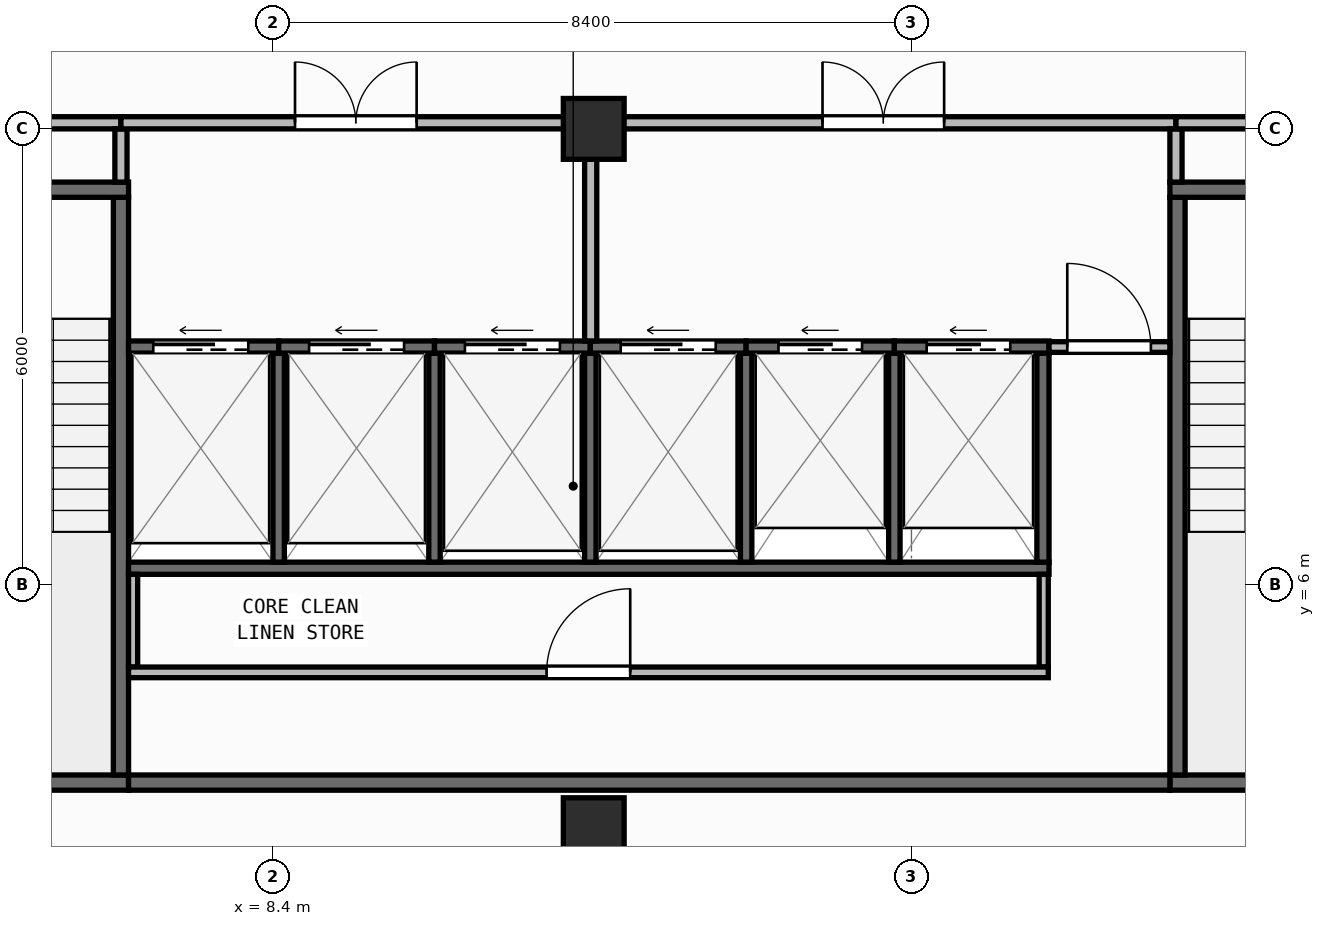
"""IFC4 building model, lengths in metres.
Left out: names, types, materials, properties, quantities, classifications, styles, units other than length and angle.
Written with IfcOpenShell. Run it as: python <this file> out.ifc"""

import sys

from ifc_helpers import new_model, si_unit, direction, frame, frame_2d, origin, origin_2d, place, context, subcontext, project, spatial, rectangle, extrude, element, fill, save


model = new_model("IFC4")
c1 = context("Model", 3, precision=1e-05, world=origin(), true_north=direction((0.0, 1.0)))
c2 = subcontext(c1, "Body", "Model", "MODEL_VIEW")
j1 = project(units=[si_unit("LENGTHUNIT", "METRE"), si_unit("PLANEANGLEUNIT", "RADIAN")], contexts=[c1])
p1 = place(None, origin())
s1 = spatial("IfcSite", under=j1, at=p1, CompositionType="ELEMENT")
p2 = place(p1, origin())
s2 = spatial("IfcBuilding", under=s1, at=p2, CompositionType="ELEMENT")
p3 = place(p2, frame((0.0, 0.0, 248.65)))
s3 = spatial("IfcBuildingStorey", under=s2, at=p3, CompositionType="ELEMENT", Elevation=248.65)
for number, where, z_axis, x_axis in (
    (1, (12.62, 2.8, 0.0), (0.0, 0.0, 1.0), (1.0, 0.0, 0.0)),
    (2, (12.62, 12.0, 0.0), (0.0, 0.0, 1.0), (1.0, 0.0, 0.0)),
):
    element("IfcColumn", number, at=place(p3, frame(where, z_axis=z_axis, x_axis=x_axis)), inside=s3, PredefinedType="COLUMN", context=c2, shape_type="SweptSolid", body=[
        extrude(rectangle(XDim=0.8, YDim=0.8, at=origin_2d()), origin(), (0.0, 0.0, 1.0), 3.95),
    ])
p4 = place(p3, frame((2.66, 0.174, 0.0), z_axis=(0.0, 0.0, 1.0), x_axis=(0.996611813627, 0.082248969229, 0.0)))
e3 = element("IfcWall", 3, at=p4, inside=s3, PredefinedType="STANDARD", context=c2, shape_type="SweptSolid", body=[
    extrude(rectangle(XDim=41.019, YDim=0.26, at=frame_2d((20.51, 0.0))), origin(), (0.0, 0.0, 1.0), 3.71),
])
p5 = place(p4, frame((19.31, 0.0, 0.9)))
e4 = element("IfcOpeningElement", 4, at=p5, cuts=e3, PredefinedType="OPENING", context=c2, shape_type="SweptSolid", body=[
    extrude(rectangle(XDim=2.4, YDim=1.65, at=frame_2d((1.2, 0.825))), frame((0.0, 0.14, 0.0), z_axis=(0.0, -1.0, 0.0), x_axis=(1.0, 0.0, 0.0)), (0.0, 0.0, 1.0), 0.28),
])
p6 = place(p3, frame((2.8, 3.4, 0.0), z_axis=(0.0, 0.0, 1.0), x_axis=(1.0, 0.0, 0.0)))
e5 = element("IfcWall", 5, at=p6, inside=s3, PredefinedType="SHEAR", context=c2, shape_type="SweptSolid", body=[
    extrude(rectangle(XDim=3.7, YDim=0.2, at=frame_2d((1.85, 0.0))), origin(), (0.0, 0.0, 1.0), 3.71),
])
p7 = place(p3, frame((6.4, 3.5, 0.0), z_axis=(0.0, 0.0, 1.0), x_axis=(0.0, 1.0, 0.0)))
e6 = element("IfcWall", 6, at=p7, inside=s3, PredefinedType="SHEAR", context=c2, shape_type="SweptSolid", body=[
    extrude(rectangle(XDim=7.6, YDim=0.2, at=frame_2d((3.8, 0.0))), origin(), (0.0, 0.0, 1.0), 3.71),
])
p8 = place(p3, frame((2.8, 11.2, 0.0), z_axis=(0.0, 0.0, 1.0), x_axis=(1.0, 0.0, 0.0)))
e7 = element("IfcWall", 7, at=p8, inside=s3, PredefinedType="SHEAR", context=c2, shape_type="SweptSolid", body=[
    extrude(rectangle(XDim=3.7, YDim=0.2, at=frame_2d((1.85, 0.0))), origin(), (0.0, 0.0, 1.0), 3.71),
])
p9 = place(p8, frame((1.2, 0.0, 0.0)))
e8 = element("IfcOpeningElement", 8, at=p9, cuts=e7, PredefinedType="OPENING", context=c2, shape_type="SweptSolid", body=[
    extrude(rectangle(XDim=1.3, YDim=2.15, at=frame_2d((0.65, 1.075))), frame((0.0, 0.11, 0.0), z_axis=(0.0, -1.0, 0.0), x_axis=(1.0, 0.0, 0.0)), (0.0, 0.0, 1.0), 0.22),
])
p10 = place(p3, frame((20.2, 3.4, 0.0), z_axis=(0.0, 0.0, 1.0), x_axis=(1.0, 0.0, 0.0)))
e9 = element("IfcWall", 9, at=p10, inside=s3, PredefinedType="SHEAR", context=c2, shape_type="SweptSolid", body=[
    extrude(rectangle(XDim=3.7, YDim=0.2, at=frame_2d((1.85, 0.0))), origin(), (0.0, 0.0, 1.0), 3.71),
])
p11 = place(p3, frame((20.3, 3.5, 0.0), z_axis=(0.0, 0.0, 1.0), x_axis=(0.0, 1.0, 0.0)))
e10 = element("IfcWall", 10, at=p11, inside=s3, PredefinedType="SHEAR", context=c2, shape_type="SweptSolid", body=[
    extrude(rectangle(XDim=7.6, YDim=0.2, at=frame_2d((3.8, 0.0))), origin(), (0.0, 0.0, 1.0), 3.71),
])
p12 = place(p3, frame((20.2, 11.2, 0.0), z_axis=(0.0, 0.0, 1.0), x_axis=(1.0, 0.0, 0.0)))
e11 = element("IfcWall", 11, at=p12, inside=s3, PredefinedType="SHEAR", context=c2, shape_type="SweptSolid", body=[
    extrude(rectangle(XDim=3.7, YDim=0.2, at=frame_2d((1.85, 0.0))), origin(), (0.0, 0.0, 1.0), 3.71),
])
p13 = place(p12, frame((1.2, 0.0, 0.0)))
e12 = element("IfcOpeningElement", 12, at=p13, cuts=e11, PredefinedType="OPENING", context=c2, shape_type="SweptSolid", body=[
    extrude(rectangle(XDim=1.3, YDim=2.15, at=frame_2d((0.65, 1.075))), frame((0.0, 0.11, 0.0), z_axis=(0.0, -1.0, 0.0), x_axis=(1.0, 0.0, 0.0)), (0.0, 0.0, 1.0), 0.22),
])
p14 = place(p3, frame((6.5, 3.4, 0.0), z_axis=(0.0, 0.0, 1.0), x_axis=(1.0, 0.0, 0.0)))
e13 = element("IfcWall", 13, at=p14, inside=s3, PredefinedType="SHEAR", context=c2, shape_type="SweptSolid", body=[
    extrude(rectangle(XDim=13.7, YDim=0.2, at=frame_2d((6.85, 0.0))), origin(), (0.0, 0.0, 1.0), 3.71),
])
p15 = place(p3, frame((6.5, 6.22, 0.0), z_axis=(0.0, 0.0, 1.0), x_axis=(1.0, 0.0, 0.0)))
e14 = element("IfcWall", 14, at=p15, inside=s3, PredefinedType="SHEAR", context=c2, shape_type="SweptSolid", body=[
    extrude(rectangle(XDim=12.11, YDim=0.16, at=frame_2d((6.055, 0.0))), origin(), (0.0, 0.0, 1.0), 3.71),
])
p16 = place(p3, frame((18.53, 6.3, 0.0), z_axis=(0.0, 0.0, 1.0), x_axis=(0.0, 1.0, 0.0)))
e15 = element("IfcWall", 15, at=p16, inside=s3, PredefinedType="SHEAR", context=c2, shape_type="SweptSolid", body=[
    extrude(rectangle(XDim=2.75, YDim=0.16, at=frame_2d((1.375, 0.0))), origin(), (0.0, 0.0, 1.0), 3.71),
])
for number, where, z_axis, x_axis in (
    (16, (8.475, 6.3, 0.0), (0.0, 0.0, 1.0), (0.0, 1.0, 0.0)),
    (17, (10.525, 6.3, 0.0), (0.0, 0.0, 1.0), (0.0, 1.0, 0.0)),
    (18, (12.575, 6.3, 0.0), (0.0, 0.0, 1.0), (0.0, 1.0, 0.0)),
    (19, (14.625, 6.3, 0.0), (0.0, 0.0, 1.0), (0.0, 1.0, 0.0)),
    (20, (16.575, 6.3, 0.0), (0.0, 0.0, 1.0), (0.0, 1.0, 0.0)),
):
    element("IfcWall", number, at=place(p3, frame(where, z_axis=z_axis, x_axis=x_axis)), inside=s3, PredefinedType="SHEAR", context=c2, shape_type="SweptSolid", body=[
        extrude(rectangle(XDim=2.75, YDim=0.15, at=frame_2d((1.375, 0.0))), origin(), (0.0, 0.0, 1.0), 3.71),
    ])
p17 = place(p3, frame((6.5, 9.13, 0.0), z_axis=(0.0, 0.0, 1.0), x_axis=(1.0, 0.0, 0.0)))
e21 = element("IfcWall", 21, at=p17, inside=s3, PredefinedType="SHEAR", context=c2, shape_type="SweptSolid", body=[
    extrude(rectangle(XDim=1.975, YDim=0.16, at=frame_2d((0.988, 0.0))), origin(), (0.0, 0.0, 1.0), 3.71),
])
p18 = place(p17, frame((0.325, 0.0, 0.0)))
e22 = element("IfcOpeningElement", 22, at=p18, cuts=e21, PredefinedType="OPENING", context=c2, shape_type="SweptSolid", body=[
    extrude(rectangle(XDim=1.25, YDim=2.15, at=frame_2d((0.625, 1.075))), frame((0.0, 0.09, 0.0), z_axis=(0.0, -1.0, 0.0), x_axis=(1.0, 0.0, 0.0)), (0.0, 0.0, 1.0), 0.18),
])
p19 = place(p3, frame((8.475, 9.13, 0.0), z_axis=(0.0, 0.0, 1.0), x_axis=(1.0, 0.0, 0.0)))
e23 = element("IfcWall", 23, at=p19, inside=s3, PredefinedType="SHEAR", context=c2, shape_type="SweptSolid", body=[
    extrude(rectangle(XDim=2.05, YDim=0.16, at=frame_2d((1.025, 0.0))), origin(), (0.0, 0.0, 1.0), 3.71),
])
p20 = place(p19, frame((0.4, 0.0, 0.0)))
e24 = element("IfcOpeningElement", 24, at=p20, cuts=e23, PredefinedType="OPENING", context=c2, shape_type="SweptSolid", body=[
    extrude(rectangle(XDim=1.25, YDim=2.15, at=frame_2d((0.625, 1.075))), frame((0.0, 0.09, 0.0), z_axis=(0.0, -1.0, 0.0), x_axis=(1.0, 0.0, 0.0)), (0.0, 0.0, 1.0), 0.18),
])
p21 = place(p3, frame((10.525, 9.13, 0.0), z_axis=(0.0, 0.0, 1.0), x_axis=(1.0, 0.0, 0.0)))
e25 = element("IfcWall", 25, at=p21, inside=s3, PredefinedType="SHEAR", context=c2, shape_type="SweptSolid", body=[
    extrude(rectangle(XDim=2.05, YDim=0.16, at=frame_2d((1.025, 0.0))), origin(), (0.0, 0.0, 1.0), 3.71),
])
p22 = place(p21, frame((0.4, 0.0, 0.0)))
e26 = element("IfcOpeningElement", 26, at=p22, cuts=e25, PredefinedType="OPENING", context=c2, shape_type="SweptSolid", body=[
    extrude(rectangle(XDim=1.25, YDim=2.15, at=frame_2d((0.625, 1.075))), frame((0.0, 0.09, 0.0), z_axis=(0.0, -1.0, 0.0), x_axis=(1.0, 0.0, 0.0)), (0.0, 0.0, 1.0), 0.18),
])
p23 = place(p3, frame((12.575, 9.13, 0.0), z_axis=(0.0, 0.0, 1.0), x_axis=(1.0, 0.0, 0.0)))
e27 = element("IfcWall", 27, at=p23, inside=s3, PredefinedType="SHEAR", context=c2, shape_type="SweptSolid", body=[
    extrude(rectangle(XDim=2.05, YDim=0.16, at=frame_2d((1.025, 0.0))), origin(), (0.0, 0.0, 1.0), 3.71),
])
p24 = place(p23, frame((0.4, 0.0, 0.0)))
e28 = element("IfcOpeningElement", 28, at=p24, cuts=e27, PredefinedType="OPENING", context=c2, shape_type="SweptSolid", body=[
    extrude(rectangle(XDim=1.25, YDim=2.15, at=frame_2d((0.625, 1.075))), frame((0.0, 0.09, 0.0), z_axis=(0.0, -1.0, 0.0), x_axis=(1.0, 0.0, 0.0)), (0.0, 0.0, 1.0), 0.18),
])
p25 = place(p3, frame((14.625, 9.13, 0.0), z_axis=(0.0, 0.0, 1.0), x_axis=(1.0, 0.0, 0.0)))
e29 = element("IfcWall", 29, at=p25, inside=s3, PredefinedType="SHEAR", context=c2, shape_type="SweptSolid", body=[
    extrude(rectangle(XDim=1.95, YDim=0.16, at=frame_2d((0.975, 0.0))), origin(), (0.0, 0.0, 1.0), 3.71),
])
p26 = place(p25, frame((0.425, 0.0, 0.0)))
e30 = element("IfcOpeningElement", 30, at=p26, cuts=e29, PredefinedType="OPENING", context=c2, shape_type="SweptSolid", body=[
    extrude(rectangle(XDim=1.1, YDim=2.15, at=frame_2d((0.55, 1.075))), frame((0.0, 0.09, 0.0), z_axis=(0.0, -1.0, 0.0), x_axis=(1.0, 0.0, 0.0)), (0.0, 0.0, 1.0), 0.18),
])
p27 = place(p3, frame((16.575, 9.13, 0.0), z_axis=(0.0, 0.0, 1.0), x_axis=(1.0, 0.0, 0.0)))
e31 = element("IfcWall", 31, at=p27, inside=s3, PredefinedType="SHEAR", context=c2, shape_type="SweptSolid", body=[
    extrude(rectangle(XDim=2.035, YDim=0.16, at=frame_2d((1.018, 0.0))), origin(), (0.0, 0.0, 1.0), 3.71),
])
p28 = place(p27, frame((0.425, 0.0, 0.0)))
e32 = element("IfcOpeningElement", 32, at=p28, cuts=e31, PredefinedType="OPENING", context=c2, shape_type="SweptSolid", body=[
    extrude(rectangle(XDim=1.1, YDim=2.15, at=frame_2d((0.55, 1.075))), frame((0.0, 0.09, 0.0), z_axis=(0.0, -1.0, 0.0), x_axis=(1.0, 0.0, 0.0)), (0.0, 0.0, 1.0), 0.18),
])
for number, where, z_axis, x_axis in (
    (33, (6.56, 4.92, 0.0), (0.0, 0.0, 1.0), (0.0, 1.0, 0.0)),
    (34, (18.54, 4.92, 0.0), (0.0, 0.0, 1.0), (0.0, 1.0, 0.0)),
):
    element("IfcWall", number, at=place(p3, frame(where, z_axis=z_axis, x_axis=x_axis)), inside=s3, PredefinedType="PARTITIONING", context=c2, shape_type="SweptSolid", body=[
        extrude(rectangle(XDim=1.22, YDim=0.12, at=frame_2d((0.61, 0.0))), origin(), (0.0, 0.0, 1.0), 3.71),
    ])
p29 = place(p3, frame((6.5, 4.85, 0.0), z_axis=(0.0, 0.0, 1.0), x_axis=(1.0, 0.0, 0.0)))
e35 = element("IfcWall", 35, at=p29, inside=s3, PredefinedType="PARTITIONING", context=c2, shape_type="SweptSolid", body=[
    extrude(rectangle(XDim=12.1, YDim=0.14, at=frame_2d((6.05, 0.0))), origin(), (0.0, 0.0, 1.0), 3.71),
])
p30 = place(p29, frame((5.5, 0.0, 0.0)))
e36 = element("IfcOpeningElement", 36, at=p30, cuts=e35, PredefinedType="OPENING", context=c2, shape_type="SweptSolid", body=[
    extrude(rectangle(XDim=1.1, YDim=2.1, at=frame_2d((0.55, 1.05))), frame((0.0, 0.08, 0.0), z_axis=(0.0, -1.0, 0.0), x_axis=(1.0, 0.0, 0.0)), (0.0, 0.0, 1.0), 0.16),
])
p31 = place(p3, frame((18.61, 9.13, 0.0), z_axis=(0.0, 0.0, 1.0), x_axis=(1.0, 0.0, 0.0)))
e37 = element("IfcWall", 37, at=p31, inside=s3, PredefinedType="PARTITIONING", context=c2, shape_type="SweptSolid", body=[
    extrude(rectangle(XDim=1.59, YDim=0.14, at=frame_2d((0.795, 0.0))), origin(), (0.0, 0.0, 1.0), 3.71),
])
p32 = place(p31, frame((0.24, 0.0, 0.0)))
e38 = element("IfcOpeningElement", 38, at=p32, cuts=e37, PredefinedType="OPENING", context=c2, shape_type="SweptSolid", body=[
    extrude(rectangle(XDim=1.1, YDim=2.1, at=frame_2d((0.55, 1.05))), frame((0.0, 0.08, 0.0), z_axis=(0.0, -1.0, 0.0), x_axis=(1.0, 0.0, 0.0)), (0.0, 0.0, 1.0), 0.16),
])
p33 = place(p3, frame((2.8, 12.08, 0.0), z_axis=(0.0, 0.0, 1.0), x_axis=(1.0, 0.0, 0.0)))
e39 = element("IfcWall", 39, at=p33, inside=s3, PredefinedType="PARTITIONING", context=c2, shape_type="SweptSolid", body=[
    extrude(rectangle(XDim=3.6, YDim=0.16, at=frame_2d((1.8, 0.0))), origin(), (0.0, 0.0, 1.0), 3.157),
])
p34 = place(p33, frame((1.0, 0.0, 0.0)))
e40 = element("IfcOpeningElement", 40, at=p34, cuts=e39, PredefinedType="OPENING", context=c2, shape_type="SweptSolid", body=[
    extrude(rectangle(XDim=1.6, YDim=2.05, at=frame_2d((0.8, 1.025))), frame((0.0, 0.09, 0.0), z_axis=(0.0, -1.0, 0.0), x_axis=(1.0, 0.0, 0.0)), (0.0, 0.0, 1.0), 0.18),
])
p35 = place(p3, frame((6.4, 11.3, 0.0), z_axis=(0.0, 0.0, 1.0), x_axis=(0.0, 1.0, 0.0)))
e41 = element("IfcWall", 41, at=p35, inside=s3, PredefinedType="PARTITIONING", context=c2, shape_type="SweptSolid", body=[
    extrude(rectangle(XDim=0.7, YDim=0.16, at=frame_2d((0.35, 0.0))), origin(), (0.0, 0.0, 1.0), 3.71),
])
p36 = place(p3, frame((6.4, 12.08, 0.0), z_axis=(0.0, 0.0, 1.0), x_axis=(1.0, 0.0, 0.0)))
e42 = element("IfcWall", 42, at=p36, inside=s3, PredefinedType="PARTITIONING", context=c2, shape_type="SweptSolid", body=[
    extrude(rectangle(XDim=6.18, YDim=0.16, at=frame_2d((3.09, 0.0))), origin(), (0.0, 0.0, 1.0), 3.157),
])
p37 = place(p36, frame((2.29, 0.0, 0.0)))
e43 = element("IfcOpeningElement", 43, at=p37, cuts=e42, PredefinedType="OPENING", context=c2, shape_type="SweptSolid", body=[
    extrude(rectangle(XDim=1.6, YDim=2.05, at=frame_2d((0.8, 1.025))), frame((0.0, 0.09, 0.0), z_axis=(0.0, -1.0, 0.0), x_axis=(1.0, 0.0, 0.0)), (0.0, 0.0, 1.0), 0.18),
])
p38 = place(p3, frame((12.58, 9.21, 0.0), z_axis=(0.0, 0.0, 1.0), x_axis=(0.0, 1.0, 0.0)))
e44 = element("IfcWall", 44, at=p38, inside=s3, PredefinedType="PARTITIONING", context=c2, shape_type="SweptSolid", body=[
    extrude(rectangle(XDim=2.79, YDim=0.16, at=frame_2d((1.395, 0.0))), origin(), (0.0, 0.0, 1.0), 3.71),
])
p39 = place(p3, frame((12.58, 12.08, 0.0), z_axis=(0.0, 0.0, 1.0), x_axis=(1.0, 0.0, 0.0)))
e45 = element("IfcWall", 45, at=p39, inside=s3, PredefinedType="PARTITIONING", context=c2, shape_type="SweptSolid", body=[
    extrude(rectangle(XDim=7.7, YDim=0.16, at=frame_2d((3.85, 0.0))), origin(), (0.0, 0.0, 1.0), 3.157),
])
p40 = place(p39, frame((3.05, 0.0, 0.0)))
e46 = element("IfcOpeningElement", 46, at=p40, cuts=e45, PredefinedType="OPENING", context=c2, shape_type="SweptSolid", body=[
    extrude(rectangle(XDim=1.6, YDim=2.05, at=frame_2d((0.8, 1.025))), frame((0.0, 0.09, 0.0), z_axis=(0.0, -1.0, 0.0), x_axis=(1.0, 0.0, 0.0)), (0.0, 0.0, 1.0), 0.18),
])
p41 = place(p3, frame((20.28, 11.3, 0.0), z_axis=(0.0, 0.0, 1.0), x_axis=(0.0, 1.0, 0.0)))
e47 = element("IfcWall", 47, at=p41, inside=s3, PredefinedType="PARTITIONING", context=c2, shape_type="SweptSolid", body=[
    extrude(rectangle(XDim=0.7, YDim=0.16, at=frame_2d((0.35, 0.0))), origin(), (0.0, 0.0, 1.0), 3.71),
])
p42 = place(p3, frame((20.28, 12.08, 0.0), z_axis=(0.0, 0.0, 1.0), x_axis=(1.0, 0.0, 0.0)))
e48 = element("IfcWall", 48, at=p42, inside=s3, PredefinedType="PARTITIONING", context=c2, shape_type="SweptSolid", body=[
    extrude(rectangle(XDim=3.62, YDim=0.16, at=frame_2d((1.81, 0.0))), origin(), (0.0, 0.0, 1.0), 3.157),
])
p43 = place(p42, frame((1.01, 0.0, 0.0)))
e49 = element("IfcOpeningElement", 49, at=p43, cuts=e48, PredefinedType="OPENING", context=c2, shape_type="SweptSolid", body=[
    extrude(rectangle(XDim=1.6, YDim=2.05, at=frame_2d((0.8, 1.025))), frame((0.0, 0.09, 0.0), z_axis=(0.0, -1.0, 0.0), x_axis=(1.0, 0.0, 0.0)), (0.0, 0.0, 1.0), 0.18),
])
p44 = place(p18, origin())
e50 = element("IfcDoor", 50, at=p44, inside=s3, OperationType="SLIDING_TO_LEFT", PredefinedType="DOOR", context=c2, shape_type="SweptSolid", body=[
    extrude(rectangle(XDim=1.25, YDim=2.15, at=frame_2d((0.625, 1.075))), frame((0.0, 0.025, 0.0), z_axis=(0.0, -1.0, 0.0), x_axis=(1.0, 0.0, 0.0)), (0.0, 0.0, 1.0), 0.05),
])
fill(e22, e50)
p45 = place(p20, origin())
e51 = element("IfcDoor", 51, at=p45, inside=s3, OperationType="SLIDING_TO_LEFT", PredefinedType="DOOR", context=c2, shape_type="SweptSolid", body=[
    extrude(rectangle(XDim=1.25, YDim=2.15, at=frame_2d((0.625, 1.075))), frame((0.0, 0.025, 0.0), z_axis=(0.0, -1.0, 0.0), x_axis=(1.0, 0.0, 0.0)), (0.0, 0.0, 1.0), 0.05),
])
fill(e24, e51)
p46 = place(p22, origin())
e52 = element("IfcDoor", 52, at=p46, inside=s3, OperationType="SLIDING_TO_LEFT", PredefinedType="DOOR", context=c2, shape_type="SweptSolid", body=[
    extrude(rectangle(XDim=1.25, YDim=2.15, at=frame_2d((0.625, 1.075))), frame((0.0, 0.025, 0.0), z_axis=(0.0, -1.0, 0.0), x_axis=(1.0, 0.0, 0.0)), (0.0, 0.0, 1.0), 0.05),
])
fill(e26, e52)
p47 = place(p24, origin())
e53 = element("IfcDoor", 53, at=p47, inside=s3, OperationType="SLIDING_TO_LEFT", PredefinedType="DOOR", context=c2, shape_type="SweptSolid", body=[
    extrude(rectangle(XDim=1.25, YDim=2.15, at=frame_2d((0.625, 1.075))), frame((0.0, 0.025, 0.0), z_axis=(0.0, -1.0, 0.0), x_axis=(1.0, 0.0, 0.0)), (0.0, 0.0, 1.0), 0.05),
])
fill(e28, e53)
p48 = place(p26, origin())
e54 = element("IfcDoor", 54, at=p48, inside=s3, OperationType="SLIDING_TO_LEFT", PredefinedType="DOOR", context=c2, shape_type="SweptSolid", body=[
    extrude(rectangle(XDim=1.1, YDim=2.15, at=frame_2d((0.55, 1.075))), frame((0.0, 0.025, 0.0), z_axis=(0.0, -1.0, 0.0), x_axis=(1.0, 0.0, 0.0)), (0.0, 0.0, 1.0), 0.05),
])
fill(e30, e54)
p49 = place(p28, origin())
e55 = element("IfcDoor", 55, at=p49, inside=s3, OperationType="SLIDING_TO_LEFT", PredefinedType="DOOR", context=c2, shape_type="SweptSolid", body=[
    extrude(rectangle(XDim=1.1, YDim=2.15, at=frame_2d((0.55, 1.075))), frame((0.0, 0.025, 0.0), z_axis=(0.0, -1.0, 0.0), x_axis=(1.0, 0.0, 0.0)), (0.0, 0.0, 1.0), 0.05),
])
fill(e32, e55)
p50 = place(p30, origin())
e56 = element("IfcDoor", 56, at=p50, inside=s3, OperationType="SINGLE_SWING_RIGHT", PredefinedType="DOOR", context=c2, shape_type="SweptSolid", body=[
    extrude(rectangle(XDim=1.1, YDim=2.1, at=frame_2d((0.55, 1.05))), frame((0.0, 0.025, 0.0), z_axis=(0.0, -1.0, 0.0), x_axis=(1.0, 0.0, 0.0)), (0.0, 0.0, 1.0), 0.05),
])
fill(e36, e56)
p51 = place(p32, origin())
e57 = element("IfcDoor", 57, at=p51, inside=s3, OperationType="SINGLE_SWING_LEFT", PredefinedType="DOOR", context=c2, shape_type="SweptSolid", body=[
    extrude(rectangle(XDim=1.1, YDim=2.1, at=frame_2d((0.55, 1.05))), frame((0.0, 0.025, 0.0), z_axis=(0.0, -1.0, 0.0), x_axis=(1.0, 0.0, 0.0)), (0.0, 0.0, 1.0), 0.05),
])
fill(e38, e57)
p52 = place(p37, origin())
e58 = element("IfcDoor", 58, at=p52, inside=s3, OperationType="DOUBLE_DOOR_SINGLE_SWING", PredefinedType="DOOR", context=c2, shape_type="SweptSolid", body=[
    extrude(rectangle(XDim=1.6, YDim=2.05, at=frame_2d((0.8, 1.025))), frame((0.0, 0.025, 0.0), z_axis=(0.0, -1.0, 0.0), x_axis=(1.0, 0.0, 0.0)), (0.0, 0.0, 1.0), 0.05),
])
fill(e43, e58)
p53 = place(p40, origin())
e59 = element("IfcDoor", 59, at=p53, inside=s3, OperationType="DOUBLE_DOOR_SINGLE_SWING", PredefinedType="DOOR", context=c2, shape_type="SweptSolid", body=[
    extrude(rectangle(XDim=1.6, YDim=2.05, at=frame_2d((0.8, 1.025))), frame((0.0, 0.025, 0.0), z_axis=(0.0, -1.0, 0.0), x_axis=(1.0, 0.0, 0.0)), (0.0, 0.0, 1.0), 0.05),
])
fill(e46, e59)
save(model, sys.argv[1])
